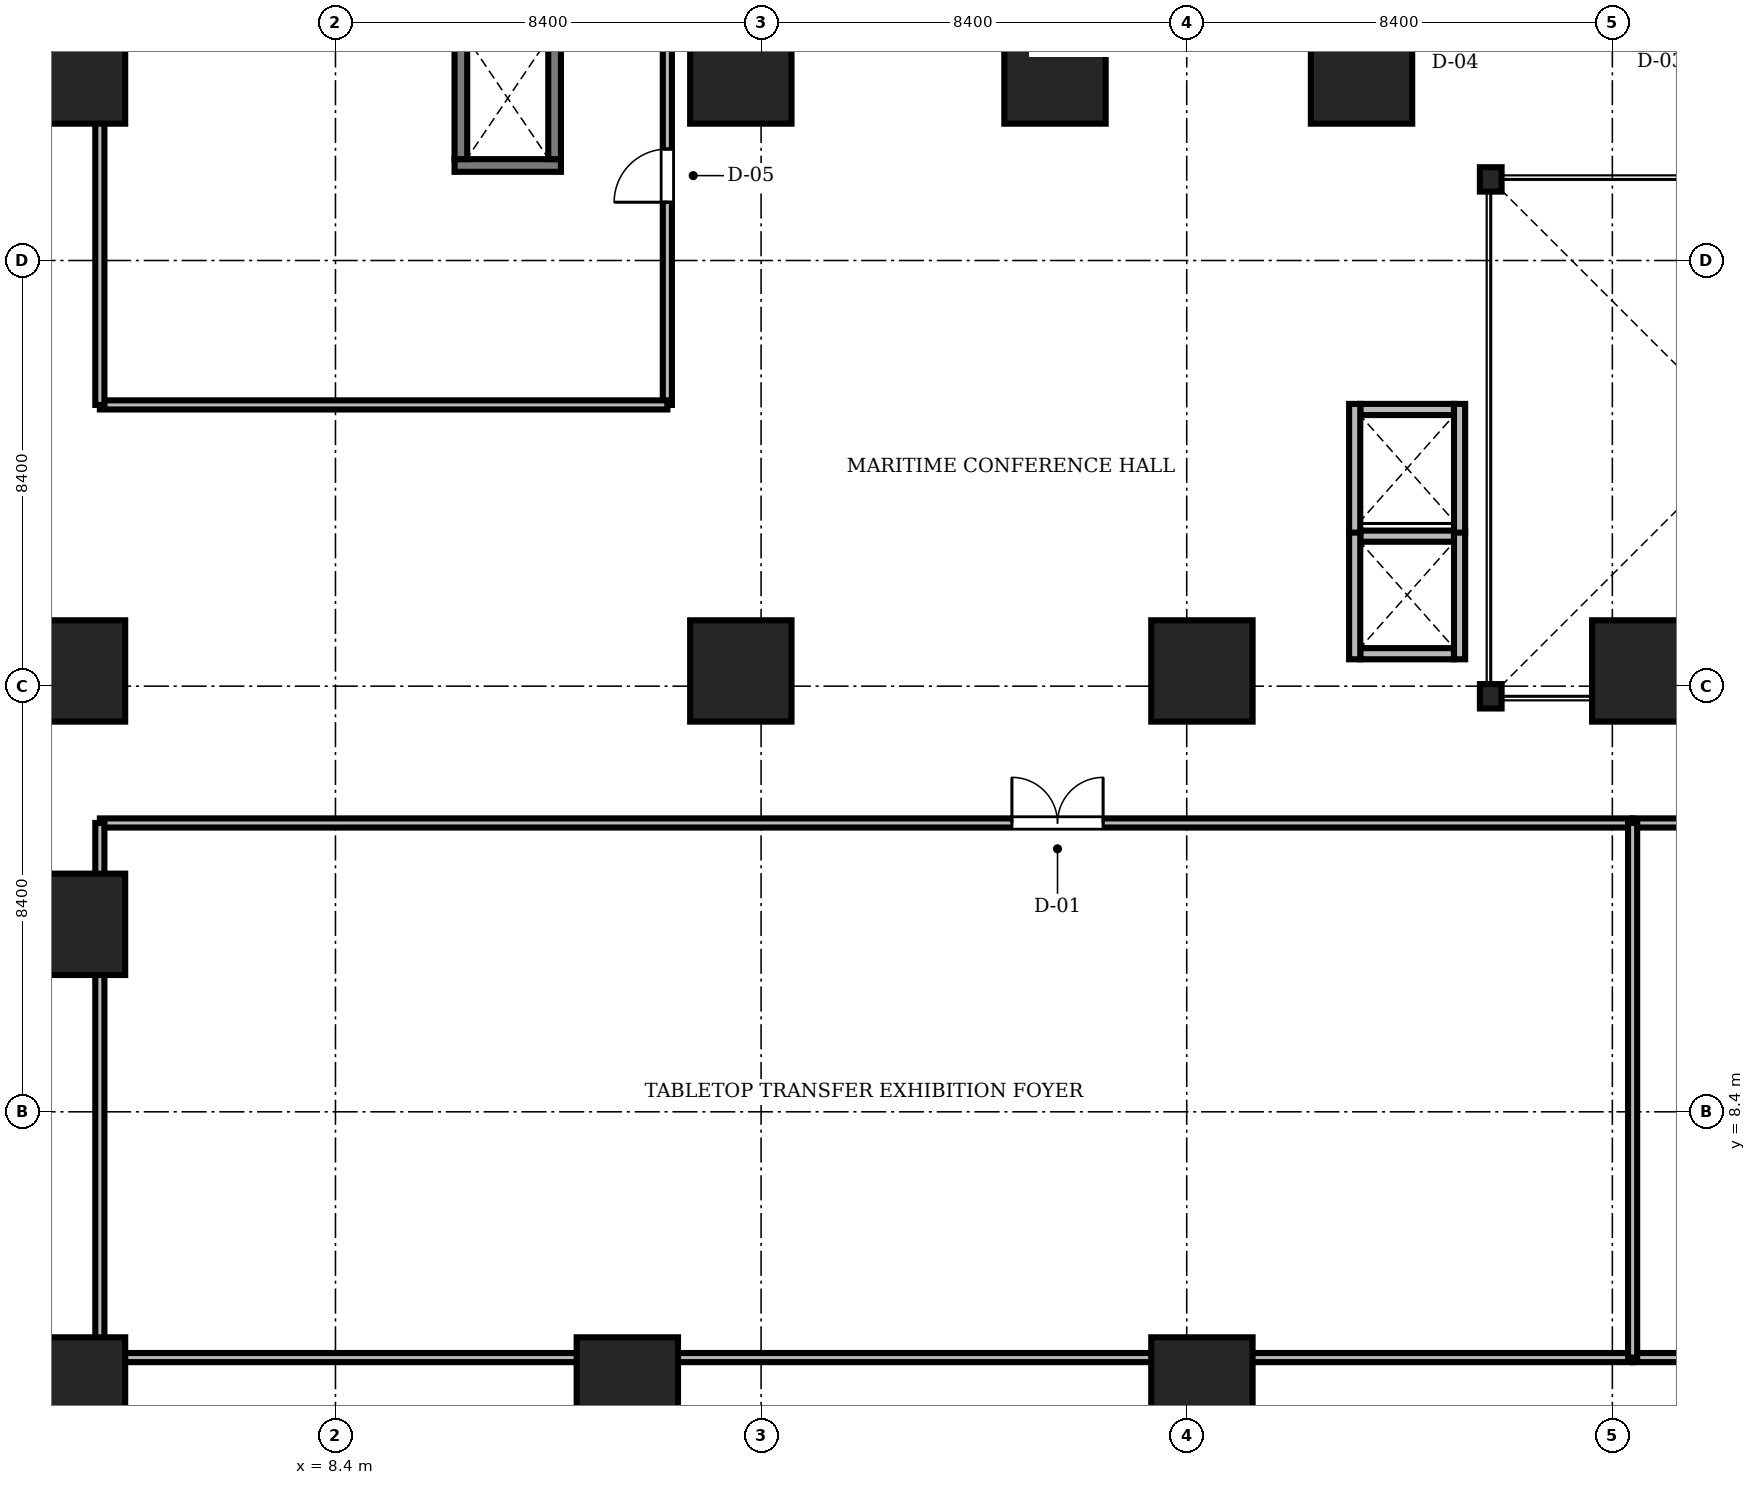
"""IFC4 building model, lengths in metres.
Left out: names, types, materials, properties, quantities, classifications, styles, units other than length and angle.
Written with IfcOpenShell. Run it as: python <this file> out.ifc"""

import sys

from ifc_helpers import new_model, si_unit, direction, frame, frame_2d, origin, origin_2d, place, context, subcontext, project, spatial, rectangle, i_section, extrude, source, transform, mapped, element, fill, save


model = new_model("IFC4")
c1 = context("Model", 3, precision=1e-05, world=origin(), true_north=direction((0.0, 1.0)))
c2 = subcontext(c1, "Body", "Model", "MODEL_VIEW")
j1 = project(units=[si_unit("LENGTHUNIT", "METRE"), si_unit("PLANEANGLEUNIT", "RADIAN")], contexts=[c1])
p1 = place(None, origin())
s1 = spatial("IfcSite", under=j1, at=p1, CompositionType="ELEMENT")
p2 = place(p1, origin())
s2 = spatial("IfcBuilding", under=s1, at=p2, CompositionType="ELEMENT")
p3 = place(p2, frame((0.0, 0.0, 11.4)))
s3 = spatial("IfcBuildingStorey", under=s2, at=p3, CompositionType="ELEMENT", Elevation=11.4)
m1 = source(origin(), c2, "Body", "SweptSolid", [
    extrude(i_section(OverallWidth=0.428, OverallDepth=0.481, WebThickness=0.04, FlangeThickness=0.063, FilletRadius=0.015, at=origin_2d()), origin(), (0.0, 0.0, 1.0), 5.2),
])
for number, where, z_axis, x_axis in (
    (1, (31.2, 16.6, 0.0), (0.0, 0.0, 1.0), (1.0, 0.0, 0.0)),
    (2, (31.2, 26.8, 0.0), (0.0, 0.0, 1.0), (1.0, 0.0, 0.0)),
):
    element("IfcColumn", number, at=place(p3, frame(where, z_axis=z_axis, x_axis=x_axis)), inside=s3, PredefinedType="COLUMN", context=c2, shape_type="MappedRepresentation", body=[
        mapped(m1, transform((0.0, 0.0, 0.0), scale=1.0)),
    ])
m2 = source(origin(), c2, "Body", "SweptSolid", [
    extrude(rectangle(XDim=2.0, YDim=2.0, at=origin_2d()), origin(), (0.0, 0.0, 1.0), 5.2),
])
for number, where, z_axis, x_axis in (
    (3, (3.25, 2.95, 0.0), (0.0, 0.0, 1.0), (1.0, 0.0, 0.0)),
    (4, (14.16, 2.95, 0.0), (0.0, 0.0, 1.0), (1.0, 0.0, 0.0)),
    (5, (25.5, 2.95, 0.0), (0.0, 0.0, 1.0), (1.0, 0.0, 0.0)),
    (6, (3.25, 12.1, 0.0), (0.0, 0.0, 1.0), (1.0, 0.0, 0.0)),
    (7, (3.25, 17.1, 0.0), (0.0, 0.0, 1.0), (1.0, 0.0, 0.0)),
    (8, (16.4, 17.1, 0.0), (0.0, 0.0, 1.0), (1.0, 0.0, 0.0)),
    (9, (25.5, 17.1, 0.0), (0.0, 0.0, 1.0), (1.0, 0.0, 0.0)),
    (10, (34.2, 17.1, 0.0), (0.0, 0.0, 1.0), (1.0, 0.0, 0.0)),
    (11, (3.25, 28.9, 0.0), (0.0, 0.0, 1.0), (1.0, 0.0, 0.0)),
    (12, (16.4, 28.9, 0.0), (0.0, 0.0, 1.0), (1.0, 0.0, 0.0)),
    (13, (22.6, 28.9, 0.0), (0.0, 0.0, 1.0), (1.0, 0.0, 0.0)),
    (14, (28.65, 28.9, 0.0), (0.0, 0.0, 1.0), (1.0, 0.0, 0.0)),
):
    element("IfcColumn", number, at=place(p3, frame(where, z_axis=z_axis, x_axis=x_axis)), inside=s3, PredefinedType="COLUMN", context=c2, shape_type="MappedRepresentation", body=[
        mapped(m2, transform((0.0, 0.0, 0.0), scale=1.0)),
    ])
m3 = source(origin(), c2, "Body", "SweptSolid", [
    extrude(rectangle(XDim=2.1, YDim=0.25, at=frame_2d((1.05, 0.0))), origin(), (0.0, 0.0, 1.0), 5.2),
])
p4 = place(p3, frame((10.75, 27.075, 0.0), z_axis=(0.0, 0.0, 1.0), x_axis=(1.0, 0.0, 0.0)))
e15 = element("IfcWall", 15, at=p4, inside=s3, PredefinedType="SOLIDWALL", context=c2, shape_type="MappedRepresentation", body=[
    mapped(m3, transform((0.0, 0.0, 0.0), scale=1.0)),
])
m4 = source(origin(), c2, "Body", "SweptSolid", [
    extrude(rectangle(XDim=2.4, YDim=0.25, at=frame_2d((1.2, 0.0))), origin(), (0.0, 0.0, 1.0), 5.2),
])
for number, where, z_axis, x_axis in (
    (16, (10.875, 27.2, 0.0), (0.0, 0.0, 1.0), (0.0, 1.0, 0.0)),
    (17, (12.725, 27.2, 0.0), (0.0, 0.0, 1.0), (0.0, 1.0, 0.0)),
):
    element("IfcWall", number, at=place(p3, frame(where, z_axis=z_axis, x_axis=x_axis)), inside=s3, PredefinedType="SOLIDWALL", context=c2, shape_type="MappedRepresentation", body=[
        mapped(m4, transform((0.0, 0.0, 0.0), scale=1.0)),
    ])
m5 = source(origin(), c2, "Body", "SweptSolid", [
    extrude(rectangle(XDim=1.85, YDim=0.22, at=frame_2d((0.925, 0.0))), origin(), (0.0, 0.0, 1.0), 3.392),
])
p5 = place(p3, frame((28.625, 17.44, 0.0), z_axis=(0.0, 0.0, 1.0), x_axis=(1.0, 0.0, 0.0)))
e18 = element("IfcWall", 18, at=p5, inside=s3, PredefinedType="SOLIDWALL", context=c2, shape_type="MappedRepresentation", body=[
    mapped(m5, transform((0.0, 0.0, 0.0), scale=1.0)),
])
m6 = source(origin(), c2, "Body", "SweptSolid", [
    extrude(rectangle(XDim=1.85, YDim=0.22, at=frame_2d((0.925, 0.0))), origin(), (0.0, 0.0, 1.0), 5.2),
])
p6 = place(p3, frame((28.625, 19.76, 0.0), z_axis=(0.0, 0.0, 1.0), x_axis=(1.0, 0.0, 0.0)))
e19 = element("IfcWall", 19, at=p6, inside=s3, PredefinedType="SOLIDWALL", context=c2, shape_type="MappedRepresentation", body=[
    mapped(m6, transform((0.0, 0.0, 0.0), scale=1.0)),
])
m7 = source(origin(), c2, "Body", "SweptSolid", [
    extrude(rectangle(XDim=2.54, YDim=0.22, at=frame_2d((1.27, 0.0))), origin(), (0.0, 0.0, 1.0), 3.392),
])
for number, where, z_axis, x_axis in (
    (20, (28.515, 17.33, 0.0), (0.0, 0.0, 1.0), (0.0, 1.0, 0.0)),
    (21, (30.585, 17.33, 0.0), (0.0, 0.0, 1.0), (0.0, 1.0, 0.0)),
):
    element("IfcWall", number, at=place(p3, frame(where, z_axis=z_axis, x_axis=x_axis)), inside=s3, PredefinedType="SOLIDWALL", context=c2, shape_type="MappedRepresentation", body=[
        mapped(m7, transform((0.0, 0.0, 0.0), scale=1.0)),
    ])
p7 = place(p3, frame((28.625, 22.26, 0.0), z_axis=(0.0, 0.0, 1.0), x_axis=(1.0, 0.0, 0.0)))
e22 = element("IfcWall", 22, at=p7, inside=s3, PredefinedType="SOLIDWALL", context=c2, shape_type="MappedRepresentation", body=[
    mapped(m6, transform((0.0, 0.0, 0.0), scale=1.0)),
])
m8 = source(origin(), c2, "Body", "SweptSolid", [
    extrude(rectangle(XDim=2.54, YDim=0.22, at=frame_2d((1.27, 0.0))), origin(), (0.0, 0.0, 1.0), 5.2),
])
for number, where, z_axis, x_axis in (
    (23, (28.515, 19.83, 0.0), (0.0, 0.0, 1.0), (0.0, 1.0, 0.0)),
    (24, (30.585, 19.83, 0.0), (0.0, 0.0, 1.0), (0.0, 1.0, 0.0)),
):
    element("IfcWall", number, at=place(p3, frame(where, z_axis=z_axis, x_axis=x_axis)), inside=s3, PredefinedType="SOLIDWALL", context=c2, shape_type="MappedRepresentation", body=[
        mapped(m8, transform((0.0, 0.0, 0.0), scale=1.0)),
    ])
m9 = source(origin(), c2, "Body", "SweptSolid", [
    extrude(rectangle(XDim=30.25, YDim=0.18, at=frame_2d((15.125, 0.0))), origin(), (0.0, 0.0, 1.0), 3.392),
])
p8 = place(p3, frame((3.75, 14.1, 0.0), z_axis=(0.0, 0.0, 1.0), x_axis=(1.0, 0.0, 0.0)))
e25 = element("IfcWall", 25, at=p8, inside=s3, PredefinedType="PARTITIONING", context=c2, shape_type="MappedRepresentation", body=[
    mapped(m9, transform((0.0, 0.0, 0.0), scale=1.0)),
])
m10 = source(origin(), c2, "Body", "SweptSolid", [
    extrude(rectangle(XDim=1.8, YDim=2.4, at=frame_2d((0.9, 1.2))), frame((0.0, 0.1, 0.0), z_axis=(0.0, -1.0, 0.0), x_axis=(1.0, 0.0, 0.0)), (0.0, 0.0, 1.0), 0.2),
])
p9 = place(p8, frame((18.0, 0.0, 0.0)))
e26 = element("IfcOpeningElement", 26, at=p9, cuts=e25, PredefinedType="OPENING", context=c2, shape_type="MappedRepresentation", body=[
    mapped(m10, transform((0.0, 0.0, 0.0), scale=1.0)),
])
p10 = place(p3, frame((34.0, 14.1, 0.0), z_axis=(0.0, 0.0, 1.0), x_axis=(1.0, 0.0, 0.0)))
e27 = element("IfcWall", 27, at=p10, inside=s3, PredefinedType="PARTITIONING", context=c2, shape_type="MappedRepresentation", body=[
    mapped(m9, transform((0.0, 0.0, 0.0), scale=1.0)),
])
p11 = place(p10, frame((10.0, 0.0, 0.0)))
e28 = element("IfcOpeningElement", 28, at=p11, cuts=e27, PredefinedType="OPENING", context=c2, shape_type="MappedRepresentation", body=[
    mapped(m10, transform((0.0, 0.0, 0.0), scale=1.0)),
])
m11 = source(origin(), c2, "Body", "SweptSolid", [
    extrude(rectangle(XDim=8.5, YDim=0.18, at=frame_2d((4.25, 0.0))), origin(), (0.0, 0.0, 1.0), 3.392),
])
p12 = place(p3, frame((14.95, 22.35, 0.0), z_axis=(0.0, 0.0, 1.0), x_axis=(0.0, 1.0, 0.0)))
e29 = element("IfcWall", 29, at=p12, inside=s3, PredefinedType="PARTITIONING", context=c2, shape_type="MappedRepresentation", body=[
    mapped(m11, transform((0.0, 0.0, 0.0), scale=1.0)),
])
m12 = source(origin(), c2, "Body", "SweptSolid", [
    extrude(rectangle(XDim=1.05, YDim=2.2, at=frame_2d((0.525, 1.1))), frame((0.0, 0.1, 0.0), z_axis=(0.0, -1.0, 0.0), x_axis=(1.0, 0.0, 0.0)), (0.0, 0.0, 1.0), 0.2),
])
p13 = place(p12, frame((4.0, 0.0, 0.0)))
e30 = element("IfcOpeningElement", 30, at=p13, cuts=e29, PredefinedType="OPENING", context=c2, shape_type="MappedRepresentation", body=[
    mapped(m12, transform((0.0, 0.0, 0.0), scale=1.0)),
])
for number, where, z_axis, x_axis in (
    (31, (3.75, 3.55, 0.0), (0.0, 0.0, 1.0), (1.0, 0.0, 0.0)),
    (32, (34.0, 3.55, 0.0), (0.0, 0.0, 1.0), (1.0, 0.0, 0.0)),
):
    element("IfcWall", number, at=place(p3, frame(where, z_axis=z_axis, x_axis=x_axis)), inside=s3, PredefinedType="PARTITIONING", context=c2, shape_type="MappedRepresentation", body=[
        mapped(m9, transform((0.0, 0.0, 0.0), scale=1.0)),
    ])
m13 = source(origin(), c2, "Body", "SweptSolid", [
    extrude(rectangle(XDim=11.2, YDim=0.18, at=frame_2d((5.6, 0.0))), origin(), (0.0, 0.0, 1.0), 3.392),
])
p14 = place(p3, frame((3.75, 22.35, 0.0), z_axis=(0.0, 0.0, 1.0), x_axis=(1.0, 0.0, 0.0)))
e33 = element("IfcWall", 33, at=p14, inside=s3, PredefinedType="PARTITIONING", context=c2, shape_type="MappedRepresentation", body=[
    mapped(m13, transform((0.0, 0.0, 0.0), scale=1.0)),
])
m14 = source(origin(), c2, "Body", "SweptSolid", [
    extrude(rectangle(XDim=10.55, YDim=0.18, at=frame_2d((5.275, 0.0))), origin(), (0.0, 0.0, 1.0), 3.392),
])
p15 = place(p3, frame((3.75, 3.55, 0.0), z_axis=(0.0, 0.0, 1.0), x_axis=(0.0, 1.0, 0.0)))
e34 = element("IfcWall", 34, at=p15, inside=s3, PredefinedType="PARTITIONING", context=c2, shape_type="MappedRepresentation", body=[
    mapped(m14, transform((0.0, 0.0, 0.0), scale=1.0)),
])
m15 = source(origin(), c2, "Body", "SweptSolid", [
    extrude(rectangle(XDim=10.55, YDim=0.18, at=frame_2d((5.275, 0.0))), origin(), (0.0, 0.0, 1.0), 5.2),
])
p16 = place(p3, frame((34.0, 3.55, 0.0), z_axis=(0.0, 0.0, 1.0), x_axis=(0.0, 1.0, 0.0)))
e35 = element("IfcWall", 35, at=p16, inside=s3, PredefinedType="PARTITIONING", context=c2, shape_type="MappedRepresentation", body=[
    mapped(m15, transform((0.0, 0.0, 0.0), scale=1.0)),
])
p17 = place(p3, frame((3.75, 22.35, 0.0), z_axis=(0.0, 0.0, 1.0), x_axis=(0.0, 1.0, 0.0)))
e36 = element("IfcWall", 36, at=p17, inside=s3, PredefinedType="PARTITIONING", context=c2, shape_type="MappedRepresentation", body=[
    mapped(m11, transform((0.0, 0.0, 0.0), scale=1.0)),
])
m16 = source(origin(), c2, "Body", "SweptSolid", [
    extrude(rectangle(XDim=1.8, YDim=2.4, at=frame_2d((0.9, 1.2))), frame((0.0, 0.025, 0.0), z_axis=(0.0, -1.0, 0.0), x_axis=(1.0, 0.0, 0.0)), (0.0, 0.0, 1.0), 0.05),
])
p18 = place(p9, origin())
e37 = element("IfcDoor", 37, at=p18, inside=s3, OperationType="DOUBLE_DOOR_SINGLE_SWING", PredefinedType="DOOR", context=c2, shape_type="MappedRepresentation", body=[
    mapped(m16, transform((0.0, 0.0, 0.0), scale=1.0)),
])
fill(e26, e37)
m17 = source(origin(), c2, "Body", "SweptSolid", [
    extrude(rectangle(XDim=1.05, YDim=2.2, at=frame_2d((0.525, 1.1))), frame((0.0, 0.025, 0.0), z_axis=(0.0, -1.0, 0.0), x_axis=(1.0, 0.0, 0.0)), (0.0, 0.0, 1.0), 0.05),
])
p19 = place(p13, origin())
e38 = element("IfcDoor", 38, at=p19, inside=s3, OperationType="SINGLE_SWING_LEFT", PredefinedType="DOOR", context=c2, shape_type="MappedRepresentation", body=[
    mapped(m17, transform((0.0, 0.0, 0.0), scale=1.0)),
])
fill(e30, e38)
save(model, sys.argv[1])
